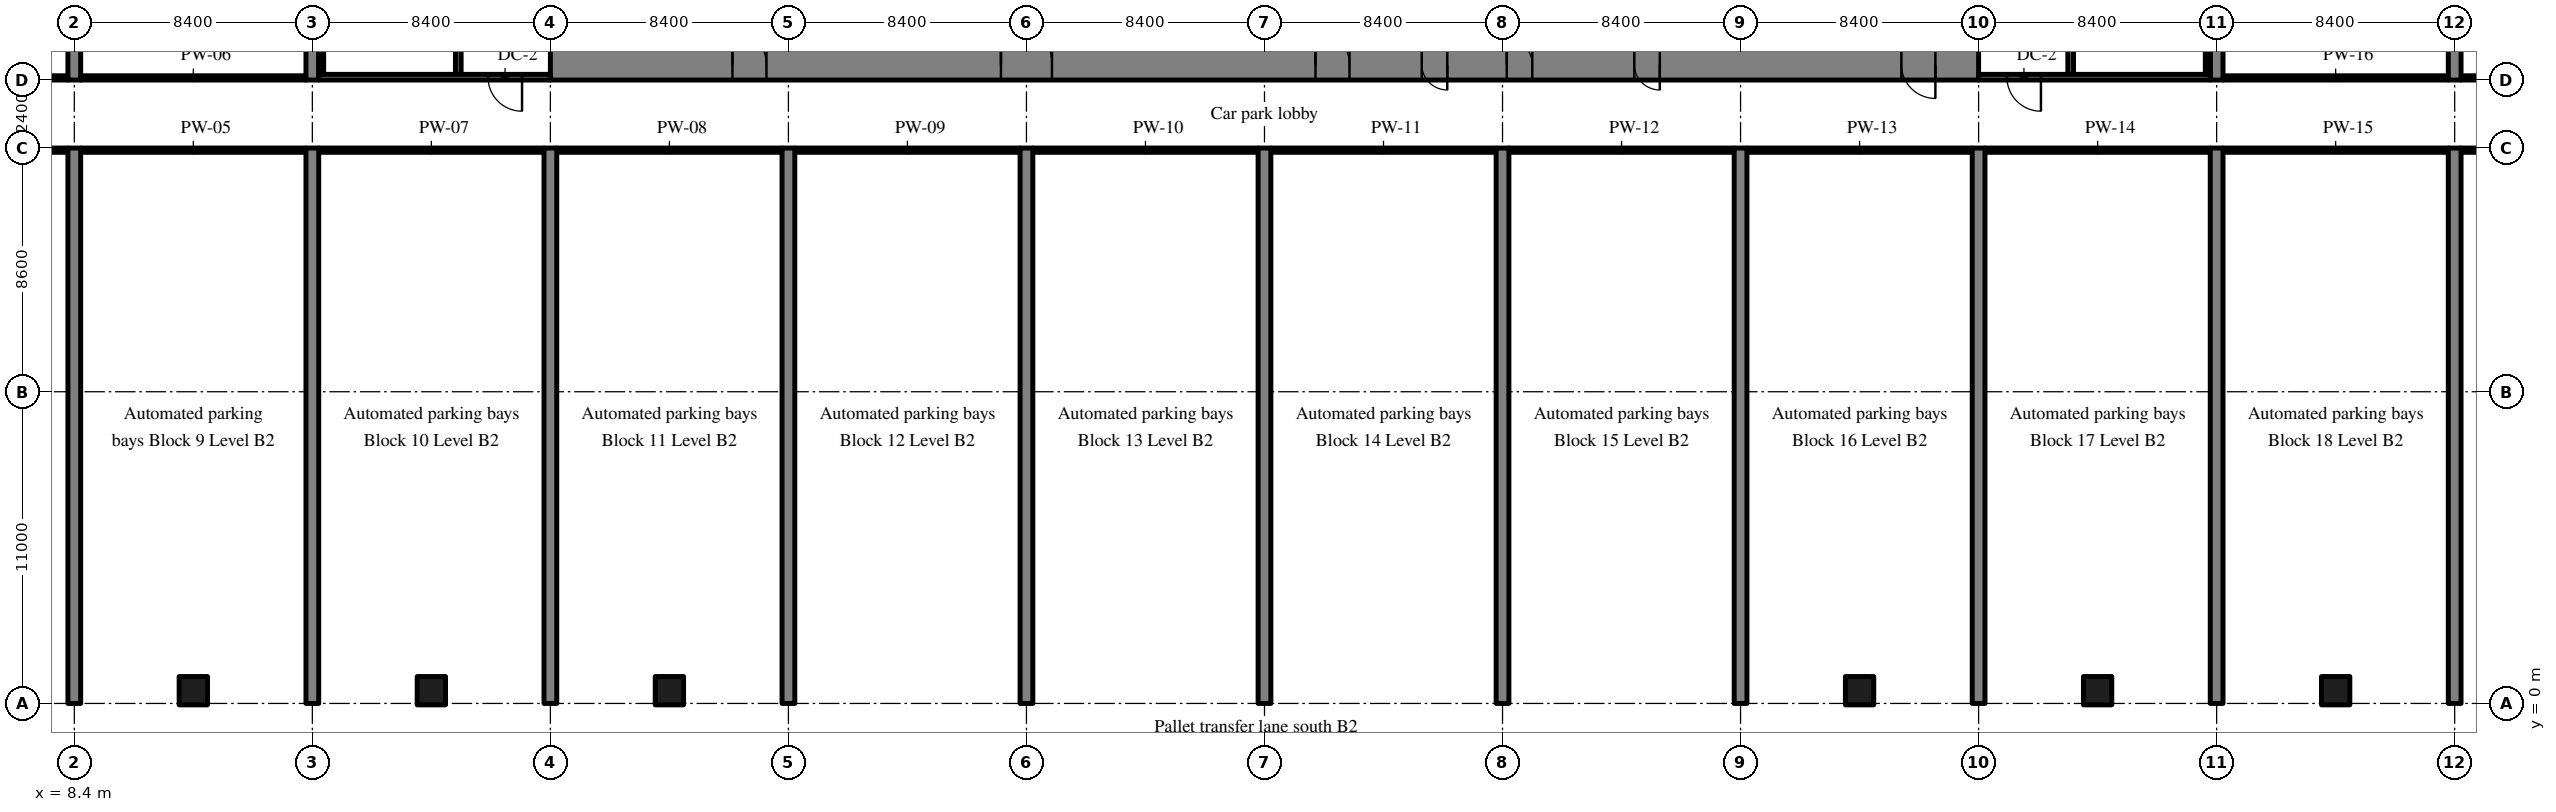
"""IFC4 building model, lengths in metres.
Left out: names, types, materials, properties, quantities, classifications, styles, units other than length and angle.
Written with IfcOpenShell. Run it as: python <this file> out.ifc"""

import sys

from ifc_helpers import new_model, si_unit, direction, frame, frame_2d, origin, origin_2d, place, context, subcontext, project, spatial, rectangle, extrude, source, transform, mapped, element, fill, save


model = new_model("IFC4")
c1 = context("Model", 3, precision=1e-05, world=origin(), true_north=direction((0.0, 1.0)))
c2 = subcontext(c1, "Body", "Model", "MODEL_VIEW")
j1 = project(units=[si_unit("LENGTHUNIT", "METRE"), si_unit("PLANEANGLEUNIT", "RADIAN")], contexts=[c1])
p1 = place(None, origin())
s1 = spatial("IfcSite", under=j1, at=p1, CompositionType="ELEMENT")
p2 = place(p1, origin())
s2 = spatial("IfcBuilding", under=s1, at=p2, CompositionType="ELEMENT")
p3 = place(p2, frame((0.0, 0.0, -9.0)))
s3 = spatial("IfcBuildingStorey", under=s2, at=p3, CompositionType="ELEMENT", Elevation=-9.0)
m1 = source(origin(), c2, "Body", "SweptSolid", [
    extrude(rectangle(XDim=50.4, YDim=1.1, at=frame_2d((25.2, 0.0))), origin(), (0.0, 0.0, 1.0), 4.22),
])
p4 = place(p3, frame((25.2, 22.55, 0.0), z_axis=(0.0, 0.0, 1.0), x_axis=(1.0, 0.0, 0.0)))
e1 = element("IfcWall", 1, at=p4, inside=s3, PredefinedType="SHEAR", context=c2, shape_type="MappedRepresentation", body=[
    mapped(m1, transform((0.0, 0.0, 0.0), scale=1.0)),
])
m2 = source(origin(), c2, "Body", "SweptSolid", [
    extrude(rectangle(XDim=1.8, YDim=2.1, at=frame_2d((0.9, 1.05))), frame((0.0, 0.56, 0.0), z_axis=(0.0, -1.0, 0.0), x_axis=(1.0, 0.0, 0.0)), (0.0, 0.0, 1.0), 1.12),
])
p5 = place(p4, frame((15.9, 0.0, 0.0)))
e2 = element("IfcOpeningElement", 2, at=p5, cuts=e1, PredefinedType="OPENING", context=c2, shape_type="MappedRepresentation", body=[
    mapped(m2, transform((0.0, 0.0, 0.0), scale=1.0)),
])
m3 = source(origin(), c2, "Body", "SweptSolid", [
    extrude(rectangle(XDim=1.2, YDim=2.1, at=frame_2d((0.6, 1.05))), frame((0.0, 0.56, 0.0), z_axis=(0.0, -1.0, 0.0), x_axis=(1.0, 0.0, 0.0)), (0.0, 0.0, 1.0), 1.12),
])
p6 = place(p4, frame((27.0, 0.0, 0.0)))
e3 = element("IfcOpeningElement", 3, at=p6, cuts=e1, PredefinedType="OPENING", context=c2, shape_type="MappedRepresentation", body=[
    mapped(m3, transform((0.0, 0.0, 0.0), scale=1.0)),
])
m4 = source(origin(), c2, "Body", "SweptSolid", [
    extrude(rectangle(XDim=0.9, YDim=2.1, at=frame_2d((0.45, 1.05))), frame((0.0, 0.56, 0.0), z_axis=(0.0, -1.0, 0.0), x_axis=(1.0, 0.0, 0.0)), (0.0, 0.0, 1.0), 1.12),
])
p7 = place(p4, frame((33.75, 0.0, 0.0)))
e4 = element("IfcOpeningElement", 4, at=p7, cuts=e1, PredefinedType="OPENING", context=c2, shape_type="MappedRepresentation", body=[
    mapped(m4, transform((0.0, 0.0, 0.0), scale=1.0)),
])
p8 = place(p4, frame((30.75, 0.0, 0.0)))
e5 = element("IfcOpeningElement", 5, at=p8, cuts=e1, PredefinedType="OPENING", context=c2, shape_type="MappedRepresentation", body=[
    mapped(m4, transform((0.0, 0.0, 0.0), scale=1.0)),
])
p9 = place(p4, frame((38.25, 0.0, 0.0)))
e6 = element("IfcOpeningElement", 6, at=p9, cuts=e1, PredefinedType="OPENING", context=c2, shape_type="MappedRepresentation", body=[
    mapped(m4, transform((0.0, 0.0, 0.0), scale=1.0)),
])
p10 = place(p4, frame((6.425, 0.0, 0.0)))
e7 = element("IfcOpeningElement", 7, at=p10, cuts=e1, PredefinedType="OPENING", context=c2, shape_type="MappedRepresentation", body=[
    mapped(m3, transform((0.0, 0.0, 0.0), scale=1.0)),
])
p11 = place(p4, frame((47.675, 0.0, 0.0)))
e8 = element("IfcOpeningElement", 8, at=p11, cuts=e1, PredefinedType="OPENING", context=c2, shape_type="MappedRepresentation", body=[
    mapped(m3, transform((0.0, 0.0, 0.0), scale=1.0)),
])
m5 = source(origin(), c2, "Body", "SweptSolid", [
    extrude(rectangle(XDim=19.6, YDim=0.45, at=frame_2d((9.8, 0.0))), origin(), (0.0, 0.0, 1.0), 4.22),
])
p12 = place(p3, frame((8.4, 0.0, 0.0), z_axis=(0.0, 0.0, 1.0), x_axis=(0.0, 1.0, 0.0)))
e9 = element("IfcWall", 9, at=p12, inside=s3, PredefinedType="SHEAR", context=c2, shape_type="MappedRepresentation", body=[
    mapped(m5, transform((0.0, 0.0, 0.0), scale=1.0)),
])
m6 = source(origin(), c2, "Body", "SweptSolid", [
    extrude(rectangle(XDim=20.0, YDim=0.45, at=frame_2d((10.0, 0.0))), origin(), (0.0, 0.0, 1.0), 4.22),
])
p13 = place(p3, frame((8.4, 22.0, 0.0), z_axis=(0.0, 0.0, 1.0), x_axis=(0.0, 1.0, 0.0)))
e10 = element("IfcWall", 10, at=p13, inside=s3, PredefinedType="SHEAR", context=c2, shape_type="MappedRepresentation", body=[
    mapped(m6, transform((0.0, 0.0, 0.0), scale=1.0)),
])
p14 = place(p3, frame((16.8, 0.0, 0.0), z_axis=(0.0, 0.0, 1.0), x_axis=(0.0, 1.0, 0.0)))
e11 = element("IfcWall", 11, at=p14, inside=s3, PredefinedType="SHEAR", context=c2, shape_type="MappedRepresentation", body=[
    mapped(m5, transform((0.0, 0.0, 0.0), scale=1.0)),
])
p15 = place(p3, frame((16.8, 22.0, 0.0), z_axis=(0.0, 0.0, 1.0), x_axis=(0.0, 1.0, 0.0)))
e12 = element("IfcWall", 12, at=p15, inside=s3, PredefinedType="SHEAR", context=c2, shape_type="MappedRepresentation", body=[
    mapped(m6, transform((0.0, 0.0, 0.0), scale=1.0)),
])
for number, where, z_axis, x_axis in (
    (13, (25.2, 0.0, 0.0), (0.0, 0.0, 1.0), (0.0, 1.0, 0.0)),
    (14, (33.6, 0.0, 0.0), (0.0, 0.0, 1.0), (0.0, 1.0, 0.0)),
    (15, (42.0, 0.0, 0.0), (0.0, 0.0, 1.0), (0.0, 1.0, 0.0)),
    (16, (50.4, 0.0, 0.0), (0.0, 0.0, 1.0), (0.0, 1.0, 0.0)),
    (17, (58.8, 0.0, 0.0), (0.0, 0.0, 1.0), (0.0, 1.0, 0.0)),
    (18, (67.2, 0.0, 0.0), (0.0, 0.0, 1.0), (0.0, 1.0, 0.0)),
    (19, (75.6, 0.0, 0.0), (0.0, 0.0, 1.0), (0.0, 1.0, 0.0)),
    (20, (84.0, 0.0, 0.0), (0.0, 0.0, 1.0), (0.0, 1.0, 0.0)),
):
    element("IfcWall", number, at=place(p3, frame(where, z_axis=z_axis, x_axis=x_axis)), inside=s3, PredefinedType="SHEAR", context=c2, shape_type="MappedRepresentation", body=[
        mapped(m5, transform((0.0, 0.0, 0.0), scale=1.0)),
    ])
p16 = place(p3, frame((84.0, 22.0, 0.0), z_axis=(0.0, 0.0, 1.0), x_axis=(0.0, 1.0, 0.0)))
e21 = element("IfcWall", 21, at=p16, inside=s3, PredefinedType="SHEAR", context=c2, shape_type="MappedRepresentation", body=[
    mapped(m6, transform((0.0, 0.0, 0.0), scale=1.0)),
])
p17 = place(p3, frame((92.4, 0.0, 0.0), z_axis=(0.0, 0.0, 1.0), x_axis=(0.0, 1.0, 0.0)))
e22 = element("IfcWall", 22, at=p17, inside=s3, PredefinedType="SHEAR", context=c2, shape_type="MappedRepresentation", body=[
    mapped(m5, transform((0.0, 0.0, 0.0), scale=1.0)),
])
p18 = place(p3, frame((92.4, 22.0, 0.0), z_axis=(0.0, 0.0, 1.0), x_axis=(0.0, 1.0, 0.0)))
e23 = element("IfcWall", 23, at=p18, inside=s3, PredefinedType="SHEAR", context=c2, shape_type="MappedRepresentation", body=[
    mapped(m6, transform((0.0, 0.0, 0.0), scale=1.0)),
])
m7 = source(origin(), c2, "Body", "SweptSolid", [
    extrude(rectangle(XDim=1.0, YDim=1.0, at=origin_2d()), origin(), (0.0, 0.0, 1.0), 4.22),
])
for number, where, z_axis, x_axis in (
    (24, (12.6, 0.45, 0.0), (0.0, 0.0, 1.0), (1.0, 0.0, 0.0)),
    (25, (21.0, 0.45, 0.0), (0.0, 0.0, 1.0), (1.0, 0.0, 0.0)),
    (26, (29.4, 0.45, 0.0), (0.0, 0.0, 1.0), (1.0, 0.0, 0.0)),
    (27, (71.4, 0.45, 0.0), (0.0, 0.0, 1.0), (1.0, 0.0, 0.0)),
    (28, (79.8, 0.45, 0.0), (0.0, 0.0, 1.0), (1.0, 0.0, 0.0)),
    (29, (88.2, 0.45, 0.0), (0.0, 0.0, 1.0), (1.0, 0.0, 0.0)),
):
    element("IfcColumn", number, at=place(p3, frame(where, z_axis=z_axis, x_axis=x_axis)), inside=s3, PredefinedType="COLUMN", context=c2, shape_type="MappedRepresentation", body=[
        mapped(m7, transform((0.0, 0.0, 0.0), scale=1.0)),
    ])
m8 = source(origin(), c2, "Body", "SweptSolid", [
    extrude(rectangle(XDim=8.3, YDim=0.2, at=frame_2d((4.15, 0.0))), origin(), (0.0, 0.0, 1.0), 4.22),
])
p19 = place(p3, frame((21.95, 22.1, 0.0), z_axis=(0.0, 0.0, 1.0), x_axis=(0.0, 1.0, 0.0)))
e30 = element("IfcWall", 30, at=p19, inside=s3, PredefinedType="SOLIDWALL", context=c2, shape_type="MappedRepresentation", body=[
    mapped(m8, transform((0.0, 0.0, 0.0), scale=1.0)),
])
m9 = source(origin(), c2, "Body", "SweptSolid", [
    extrude(rectangle(XDim=1.2, YDim=2.1, at=frame_2d((0.6, 1.05))), frame((0.0, 0.11, 0.0), z_axis=(0.0, -1.0, 0.0), x_axis=(1.0, 0.0, 0.0)), (0.0, 0.0, 1.0), 0.22),
])
p20 = place(p19, frame((6.5, 0.0, 0.0)))
e31 = element("IfcOpeningElement", 31, at=p20, cuts=e30, PredefinedType="OPENING", context=c2, shape_type="MappedRepresentation", body=[
    mapped(m9, transform((0.0, 0.0, 0.0), scale=1.0)),
])
m10 = source(origin(), c2, "Body", "SweptSolid", [
    extrude(rectangle(XDim=8.175, YDim=0.2, at=frame_2d((4.087, 0.0))), origin(), (0.0, 0.0, 1.0), 4.22),
])
p21 = place(p3, frame((17.025, 22.1, 0.0), z_axis=(0.0, 0.0, 1.0), x_axis=(1.0, 0.0, 0.0)))
e32 = element("IfcWall", 32, at=p21, inside=s3, PredefinedType="SOLIDWALL", context=c2, shape_type="MappedRepresentation", body=[
    mapped(m10, transform((0.0, 0.0, 0.0), scale=1.0)),
])
p22 = place(p21, frame((5.975, 0.0, 0.0)))
e33 = element("IfcOpeningElement", 33, at=p22, cuts=e32, PredefinedType="OPENING", context=c2, shape_type="MappedRepresentation", body=[
    mapped(m9, transform((0.0, 0.0, 0.0), scale=1.0)),
])
p23 = place(p3, frame((78.85, 22.1, 0.0), z_axis=(0.0, 0.0, 1.0), x_axis=(0.0, 1.0, 0.0)))
e34 = element("IfcWall", 34, at=p23, inside=s3, PredefinedType="SOLIDWALL", context=c2, shape_type="MappedRepresentation", body=[
    mapped(m8, transform((0.0, 0.0, 0.0), scale=1.0)),
])
p24 = place(p23, frame((6.5, 0.0, 0.0)))
e35 = element("IfcOpeningElement", 35, at=p24, cuts=e34, PredefinedType="OPENING", context=c2, shape_type="MappedRepresentation", body=[
    mapped(m9, transform((0.0, 0.0, 0.0), scale=1.0)),
])
m11 = source(origin(), c2, "Body", "SweptSolid", [
    extrude(rectangle(XDim=8.175, YDim=0.2, at=frame_2d((4.087, 0.0))), origin(), (0.0, 0.0, 1.0), 4.22),
])
p25 = place(p3, frame((83.775, 22.1, 0.0), z_axis=(0.0, 0.0, 1.0), x_axis=(-1.0, 0.0, 0.0)))
e36 = element("IfcWall", 36, at=p25, inside=s3, PredefinedType="SOLIDWALL", context=c2, shape_type="MappedRepresentation", body=[
    mapped(m11, transform((0.0, 0.0, 0.0), scale=1.0)),
])
p26 = place(p25, frame((5.975, 0.0, 0.0)))
e37 = element("IfcOpeningElement", 37, at=p26, cuts=e36, PredefinedType="OPENING", context=c2, shape_type="MappedRepresentation", body=[
    mapped(m9, transform((0.0, 0.0, 0.0), scale=1.0)),
])
m12 = source(origin(), c2, "Body", "SweptSolid", [
    extrude(rectangle(XDim=8.1, YDim=0.175, at=frame_2d((4.05, 0.0))), origin(), (0.0, 0.0, 1.0), 4.22),
])
for number, where, z_axis, x_axis in (
    (38, (17.112, 22.2, 0.0), (0.0, 0.0, 1.0), (0.0, 1.0, 0.0)),
    (39, (83.688, 22.2, 0.0), (0.0, 0.0, 1.0), (0.0, 1.0, 0.0)),
):
    element("IfcWall", number, at=place(p3, frame(where, z_axis=z_axis, x_axis=x_axis)), inside=s3, PredefinedType="SOLIDWALL", context=c2, shape_type="MappedRepresentation", body=[
        mapped(m12, transform((0.0, 0.0, 0.0), scale=1.0)),
    ])
m13 = source(origin(), c2, "Body", "SweptSolid", [
    extrude(rectangle(XDim=7.725, YDim=0.15, at=frame_2d((3.863, 0.0))), origin(), (0.0, 0.0, 1.0), 4.22),
])
for number, where, z_axis, x_axis in (
    (40, (0.45, 19.525, 0.0), (0.0, 0.0, 1.0), (1.0, 0.0, 0.0)),
    (41, (0.45, 22.075, 0.0), (0.0, 0.0, 1.0), (1.0, 0.0, 0.0)),
):
    element("IfcWall", number, at=place(p3, frame(where, z_axis=z_axis, x_axis=x_axis)), inside=s3, PredefinedType="PARTITIONING", context=c2, shape_type="MappedRepresentation", body=[
        mapped(m13, transform((0.0, 0.0, 0.0), scale=1.0)),
    ])
m14 = source(origin(), c2, "Body", "SweptSolid", [
    extrude(rectangle(XDim=7.95, YDim=0.15, at=frame_2d((3.975, 0.0))), origin(), (0.0, 0.0, 1.0), 4.22),
])
for number, where, z_axis, x_axis in (
    (42, (8.625, 19.525, 0.0), (0.0, 0.0, 1.0), (1.0, 0.0, 0.0)),
    (43, (8.625, 22.075, 0.0), (0.0, 0.0, 1.0), (1.0, 0.0, 0.0)),
):
    element("IfcWall", number, at=place(p3, frame(where, z_axis=z_axis, x_axis=x_axis)), inside=s3, PredefinedType="PARTITIONING", context=c2, shape_type="MappedRepresentation", body=[
        mapped(m14, transform((0.0, 0.0, 0.0), scale=1.0)),
    ])
m15 = source(origin(), c2, "Body", "SweptSolid", [
    extrude(rectangle(XDim=7.95, YDim=0.15, at=frame_2d((3.975, 0.0))), origin(), (0.0, 0.0, 1.0), 4.22),
])
p27 = place(p3, frame((17.025, 19.525, 0.0), z_axis=(0.0, 0.0, 1.0), x_axis=(1.0, 0.0, 0.0)))
e44 = element("IfcWall", 44, at=p27, inside=s3, PredefinedType="PARTITIONING", context=c2, shape_type="MappedRepresentation", body=[
    mapped(m15, transform((0.0, 0.0, 0.0), scale=1.0)),
])
for number, where, z_axis, x_axis in (
    (45, (25.425, 19.525, 0.0), (0.0, 0.0, 1.0), (1.0, 0.0, 0.0)),
    (46, (33.825, 19.525, 0.0), (0.0, 0.0, 1.0), (1.0, 0.0, 0.0)),
    (47, (42.225, 19.525, 0.0), (0.0, 0.0, 1.0), (1.0, 0.0, 0.0)),
    (48, (50.625, 19.525, 0.0), (0.0, 0.0, 1.0), (1.0, 0.0, 0.0)),
):
    element("IfcWall", number, at=place(p3, frame(where, z_axis=z_axis, x_axis=x_axis)), inside=s3, PredefinedType="PARTITIONING", context=c2, shape_type="MappedRepresentation", body=[
        mapped(m14, transform((0.0, 0.0, 0.0), scale=1.0)),
    ])
p28 = place(p3, frame((59.025, 19.525, 0.0), z_axis=(0.0, 0.0, 1.0), x_axis=(1.0, 0.0, 0.0)))
e49 = element("IfcWall", 49, at=p28, inside=s3, PredefinedType="PARTITIONING", context=c2, shape_type="MappedRepresentation", body=[
    mapped(m15, transform((0.0, 0.0, 0.0), scale=1.0)),
])
for number, where, z_axis, x_axis in (
    (50, (67.425, 19.525, 0.0), (0.0, 0.0, 1.0), (1.0, 0.0, 0.0)),
    (51, (75.825, 19.525, 0.0), (0.0, 0.0, 1.0), (1.0, 0.0, 0.0)),
    (52, (84.225, 19.525, 0.0), (0.0, 0.0, 1.0), (1.0, 0.0, 0.0)),
    (53, (84.225, 22.075, 0.0), (0.0, 0.0, 1.0), (1.0, 0.0, 0.0)),
):
    element("IfcWall", number, at=place(p3, frame(where, z_axis=z_axis, x_axis=x_axis)), inside=s3, PredefinedType="PARTITIONING", context=c2, shape_type="MappedRepresentation", body=[
        mapped(m14, transform((0.0, 0.0, 0.0), scale=1.0)),
    ])
for number, where, z_axis, x_axis in (
    (54, (92.625, 19.525, 0.0), (0.0, 0.0, 1.0), (1.0, 0.0, 0.0)),
    (55, (92.625, 22.075, 0.0), (0.0, 0.0, 1.0), (1.0, 0.0, 0.0)),
):
    element("IfcWall", number, at=place(p3, frame(where, z_axis=z_axis, x_axis=x_axis)), inside=s3, PredefinedType="PARTITIONING", context=c2, shape_type="MappedRepresentation", body=[
        mapped(m13, transform((0.0, 0.0, 0.0), scale=1.0)),
    ])
m16 = source(origin(), c2, "Body", "SweptSolid", [
    extrude(rectangle(XDim=1.8, YDim=2.1, at=frame_2d((0.9, 1.05))), frame((0.0, 0.325, 0.0), z_axis=(0.0, -1.0, 0.0), x_axis=(1.0, 0.0, 0.0)), (0.0, 0.0, 1.0), 0.05),
])
p29 = place(p5, origin())
e56 = element("IfcDoor", 56, at=p29, inside=s3, OperationType="DOUBLE_DOOR_SINGLE_SWING", PredefinedType="DOOR", context=c2, shape_type="MappedRepresentation", body=[
    mapped(m16, transform((0.0, 0.0, 0.0), scale=1.0)),
])
fill(e2, e56)
m17 = source(origin(), c2, "Body", "SweptSolid", [
    extrude(rectangle(XDim=1.2, YDim=2.1, at=frame_2d((0.6, 1.05))), frame((0.0, 0.325, 0.0), z_axis=(0.0, -1.0, 0.0), x_axis=(1.0, 0.0, 0.0)), (0.0, 0.0, 1.0), 0.05),
])
p30 = place(p6, origin())
e57 = element("IfcDoor", 57, at=p30, inside=s3, OperationType="SINGLE_SWING_LEFT", PredefinedType="DOOR", context=c2, shape_type="MappedRepresentation", body=[
    mapped(m17, transform((0.0, 0.0, 0.0), scale=1.0)),
])
fill(e3, e57)
m18 = source(origin(), c2, "Body", "SweptSolid", [
    extrude(rectangle(XDim=0.9, YDim=2.1, at=frame_2d((0.45, 1.05))), frame((0.0, 0.325, 0.0), z_axis=(0.0, -1.0, 0.0), x_axis=(1.0, 0.0, 0.0)), (0.0, 0.0, 1.0), 0.05),
])
p31 = place(p7, origin())
e58 = element("IfcDoor", 58, at=p31, inside=s3, OperationType="SINGLE_SWING_LEFT", PredefinedType="DOOR", context=c2, shape_type="MappedRepresentation", body=[
    mapped(m18, transform((0.0, 0.0, 0.0), scale=1.0)),
])
fill(e4, e58)
p32 = place(p8, origin())
e59 = element("IfcDoor", 59, at=p32, inside=s3, OperationType="SINGLE_SWING_RIGHT", PredefinedType="DOOR", context=c2, shape_type="MappedRepresentation", body=[
    mapped(m18, transform((0.0, 0.0, 0.0), scale=1.0)),
])
fill(e5, e59)
p33 = place(p9, origin())
e60 = element("IfcDoor", 60, at=p33, inside=s3, OperationType="SINGLE_SWING_RIGHT", PredefinedType="DOOR", context=c2, shape_type="MappedRepresentation", body=[
    mapped(m18, transform((0.0, 0.0, 0.0), scale=1.0)),
])
fill(e6, e60)
p34 = place(p10, origin())
e61 = element("IfcDoor", 61, at=p34, inside=s3, OperationType="SINGLE_SWING_LEFT", PredefinedType="DOOR", context=c2, shape_type="MappedRepresentation", body=[
    mapped(m17, transform((0.0, 0.0, 0.0), scale=1.0)),
])
fill(e7, e61)
p35 = place(p11, origin())
e62 = element("IfcDoor", 62, at=p35, inside=s3, OperationType="SINGLE_SWING_RIGHT", PredefinedType="DOOR", context=c2, shape_type="MappedRepresentation", body=[
    mapped(m17, transform((0.0, 0.0, 0.0), scale=1.0)),
])
fill(e8, e62)
m19 = source(origin(), c2, "Body", "SweptSolid", [
    extrude(rectangle(XDim=1.2, YDim=2.1, at=frame_2d((0.6, 1.05))), frame((0.0, 0.025, 0.0), z_axis=(0.0, -1.0, 0.0), x_axis=(1.0, 0.0, 0.0)), (0.0, 0.0, 1.0), 0.05),
])
p36 = place(p22, origin())
e63 = element("IfcDoor", 63, at=p36, inside=s3, OperationType="SINGLE_SWING_RIGHT", PredefinedType="DOOR", context=c2, shape_type="MappedRepresentation", body=[
    mapped(m19, transform((0.0, 0.0, 0.0), scale=1.0)),
])
fill(e33, e63)
p37 = place(p26, origin())
e64 = element("IfcDoor", 64, at=p37, inside=s3, OperationType="SINGLE_SWING_LEFT", PredefinedType="DOOR", context=c2, shape_type="MappedRepresentation", body=[
    mapped(m19, transform((0.0, 0.0, 0.0), scale=1.0)),
])
fill(e37, e64)
save(model, sys.argv[1])
